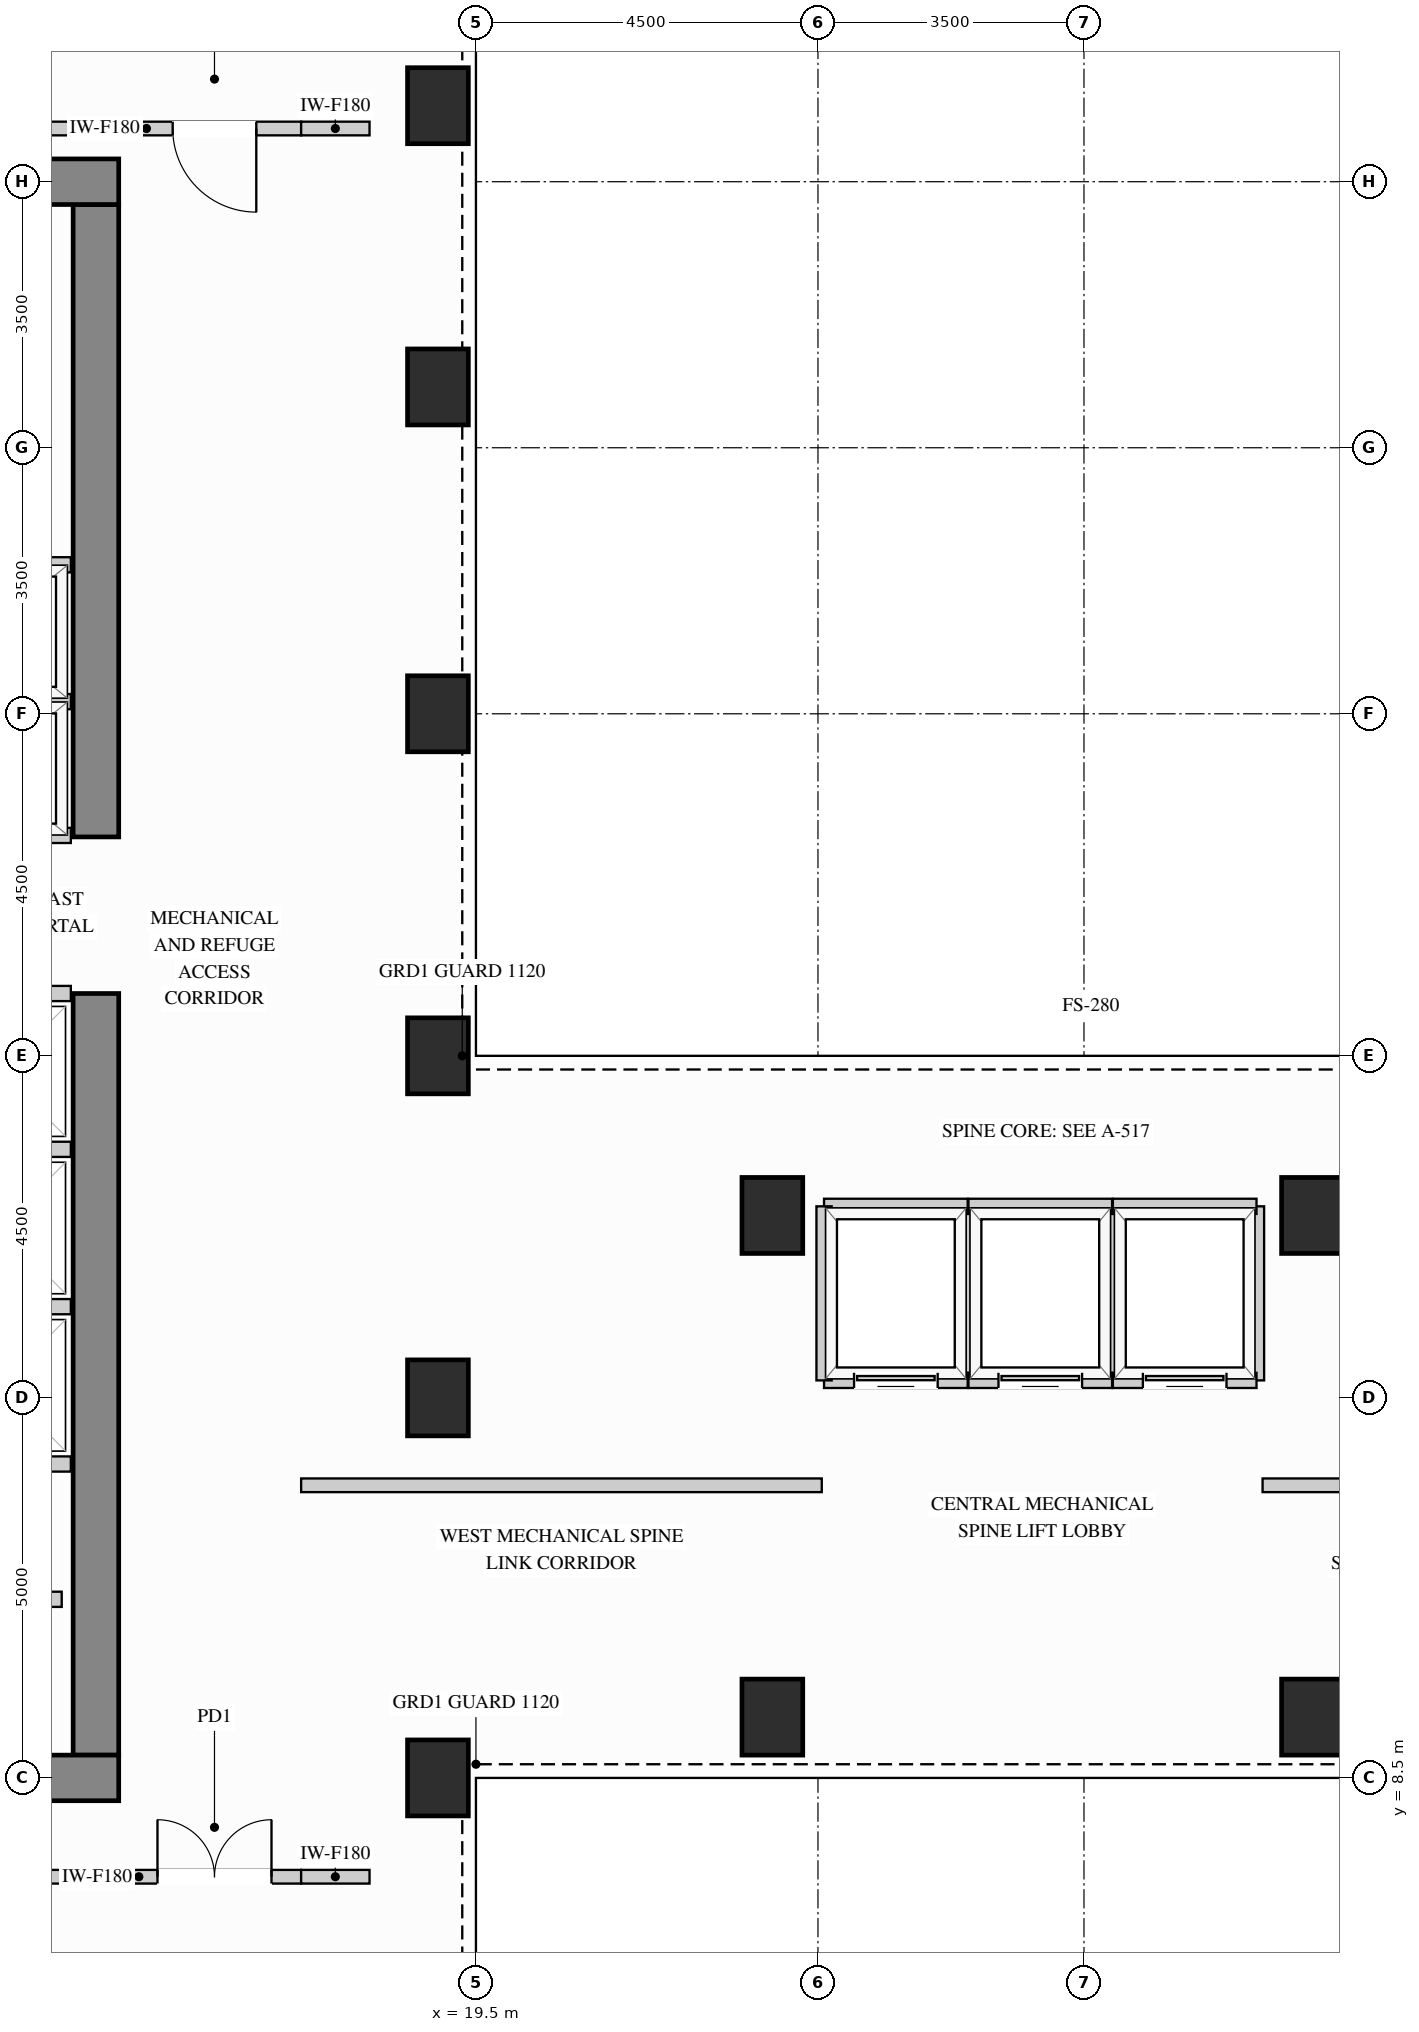
"""IFC4 building model, lengths in metres.
Left out: names, types, materials, properties, quantities, classifications, styles, units other than length and angle.
Written with IfcOpenShell. Run it as: python <this file> out.ifc"""

import sys

from ifc_helpers import new_model, si_unit, direction, frame, frame_2d, origin, origin_2d, place, context, subcontext, project, spatial, rectangle, extrude, source, transform, mapped, element, fill, save


model = new_model("IFC4")
c1 = context("Model", 3, precision=1e-05, world=origin(), true_north=direction((0.0, 1.0)))
c2 = subcontext(c1, "Body", "Model", "MODEL_VIEW")
j1 = project(units=[si_unit("LENGTHUNIT", "METRE"), si_unit("PLANEANGLEUNIT", "RADIAN")], contexts=[c1])
p1 = place(None, origin())
s1 = spatial("IfcSite", under=j1, at=p1, CompositionType="ELEMENT")
p2 = place(p1, origin())
s2 = spatial("IfcBuilding", under=s1, at=p2, CompositionType="ELEMENT")
p3 = place(p2, frame((0.0, 0.0, 207.9)))
s3 = spatial("IfcBuildingStorey", under=s2, at=p3, CompositionType="ELEMENT", Elevation=207.9)
m1 = source(origin(), c2, "Body", "SweptSolid", [
    extrude(rectangle(XDim=0.8, YDim=1.0, at=origin_2d()), origin(), (0.0, 0.0, 1.0), 4.26),
])
for number, where, z_axis, x_axis in (
    (1, (19.0, 13.5, 0.0), (0.0, 0.0, 1.0), (1.0, 0.0, 0.0)),
    (2, (19.0, 18.0, 0.0), (0.0, 0.0, 1.0), (1.0, 0.0, 0.0)),
    (3, (19.0, 22.5, 0.0), (0.0, 0.0, 1.0), (1.0, 0.0, 0.0)),
    (4, (19.0, 26.8, 0.0), (0.0, 0.0, 1.0), (1.0, 0.0, 0.0)),
    (5, (19.0, 30.5, 0.0), (0.0, 0.0, 1.0), (1.0, 0.0, 0.0)),
    (6, (19.0, 8.5, 0.0), (0.0, 0.0, 1.0), (1.0, 0.0, 0.0)),
    (7, (23.4, 15.9, 0.0), (0.0, 0.0, 1.0), (1.0, 0.0, 0.0)),
    (8, (23.4, 9.3, 0.0), (0.0, 0.0, 1.0), (1.0, 0.0, 0.0)),
    (9, (30.5, 15.9, 0.0), (0.0, 0.0, 1.0), (1.0, 0.0, 0.0)),
    (10, (30.5, 9.3, 0.0), (0.0, 0.0, 1.0), (1.0, 0.0, 0.0)),
):
    element("IfcColumn", number, at=place(p3, frame(where, z_axis=z_axis, x_axis=x_axis)), inside=s3, PredefinedType="COLUMN", context=c2, shape_type="MappedRepresentation", body=[
        mapped(m1, transform((0.0, 0.0, 0.0), x_axis=(1.0, 0.0, 0.0), y_axis=(0.0, 1.0, 0.0), z_axis=(0.0, 0.0, 1.0))),
    ])
m2 = source(origin(), c2, "Body", "SweptSolid", [
    extrude(rectangle(XDim=10.02, YDim=0.6, at=frame_2d((5.01, 0.0))), origin(), (0.0, 0.0, 1.0), 4.26),
])
p4 = place(p3, frame((14.5, 8.8, 0.0), z_axis=(0.0, 0.0, 1.0), x_axis=(0.0, 1.0, 0.0)))
e11 = element("IfcWall", 11, at=p4, inside=s3, PredefinedType="SHEAR", context=c2, shape_type="MappedRepresentation", body=[
    mapped(m2, transform((0.0, 0.0, 0.0), x_axis=(1.0, 0.0, 0.0), y_axis=(0.0, 1.0, 0.0), z_axis=(0.0, 0.0, 1.0))),
])
m3 = source(origin(), c2, "Body", "SweptSolid", [
    extrude(rectangle(XDim=8.32, YDim=0.6, at=frame_2d((4.16, 0.0))), origin(), (0.0, 0.0, 1.0), 4.26),
])
p5 = place(p3, frame((14.5, 20.88, 0.0), z_axis=(0.0, 0.0, 1.0), x_axis=(0.0, 1.0, 0.0)))
e12 = element("IfcWall", 12, at=p5, inside=s3, PredefinedType="SHEAR", context=c2, shape_type="MappedRepresentation", body=[
    mapped(m3, transform((0.0, 0.0, 0.0), x_axis=(1.0, 0.0, 0.0), y_axis=(0.0, 1.0, 0.0), z_axis=(0.0, 0.0, 1.0))),
])
m4 = source(origin(), c2, "Body", "SweptSolid", [
    extrude(rectangle(XDim=10.6, YDim=0.6, at=frame_2d((5.3, 0.0))), origin(), (0.0, 0.0, 1.0), 4.26),
])
for number, where, z_axis, x_axis in (
    (13, (4.2, 29.5, 0.0), (0.0, 0.0, 1.0), (1.0, 0.0, 0.0)),
    (14, (4.2, 8.5, 0.0), (0.0, 0.0, 1.0), (1.0, 0.0, 0.0)),
):
    element("IfcWall", number, at=place(p3, frame(where, z_axis=z_axis, x_axis=x_axis)), inside=s3, PredefinedType="SHEAR", context=c2, shape_type="MappedRepresentation", body=[
        mapped(m4, transform((0.0, 0.0, 0.0), x_axis=(1.0, 0.0, 0.0), y_axis=(0.0, 1.0, 0.0), z_axis=(0.0, 0.0, 1.0))),
    ])
p6 = place(p3, frame((14.92, 7.2, 0.0), z_axis=(0.0, 0.0, 1.0), x_axis=(1.0, 0.0, 0.0)))
e15 = element("IfcWall", 15, at=p6, inside=s3, PredefinedType="PARTITIONING", context=c2, shape_type="SweptSolid", body=[
    extrude(rectangle(XDim=2.28, YDim=0.18, at=frame_2d((1.14, 0.0))), origin(), (0.0, 0.0, 1.0), 4.245),
])
p7 = place(p6, frame((0.39, 0.0, 0.0)))
e16 = element("IfcOpeningElement", 16, at=p7, cuts=e15, PredefinedType="OPENING", context=c2, shape_type="SweptSolid", body=[
    extrude(rectangle(XDim=1.5, YDim=2.2, at=frame_2d((0.75, 1.1))), frame((0.0, 0.1, 0.0), z_axis=(0.0, -1.0, 0.0), x_axis=(1.0, 0.0, 0.0)), (0.0, 0.0, 1.0), 0.2),
])
m5 = source(origin(), c2, "Body", "SweptSolid", [
    extrude(rectangle(XDim=13.42, YDim=0.18, at=frame_2d((6.71, 0.0))), origin(), (0.0, 0.0, 1.0), 4.245),
])
p8 = place(p3, frame((1.5, 7.2, 0.0), z_axis=(0.0, 0.0, 1.0), x_axis=(1.0, 0.0, 0.0)))
e17 = element("IfcWall", 17, at=p8, inside=s3, PredefinedType="PARTITIONING", context=c2, shape_type="MappedRepresentation", body=[
    mapped(m5, transform((0.0, 0.0, 0.0), x_axis=(1.0, 0.0, 0.0), y_axis=(0.0, 1.0, 0.0), z_axis=(0.0, 0.0, 1.0))),
])
m6 = source(origin(), c2, "Body", "SweptSolid", [
    extrude(rectangle(XDim=0.9, YDim=0.18, at=frame_2d((0.45, 0.0))), origin(), (0.0, 0.0, 1.0), 4.245),
])
p9 = place(p3, frame((17.2, 7.2, 0.0), z_axis=(0.0, 0.0, 1.0), x_axis=(1.0, 0.0, 0.0)))
e18 = element("IfcWall", 18, at=p9, inside=s3, PredefinedType="PARTITIONING", context=c2, shape_type="MappedRepresentation", body=[
    mapped(m6, transform((0.0, 0.0, 0.0), x_axis=(1.0, 0.0, 0.0), y_axis=(0.0, 1.0, 0.0), z_axis=(0.0, 0.0, 1.0))),
])
p10 = place(p3, frame((14.92, 30.2, 0.0), z_axis=(0.0, 0.0, 1.0), x_axis=(1.0, 0.0, 0.0)))
e19 = element("IfcWall", 19, at=p10, inside=s3, PredefinedType="PARTITIONING", context=c2, shape_type="SweptSolid", body=[
    extrude(rectangle(XDim=2.28, YDim=0.18, at=frame_2d((1.14, 0.0))), origin(), (0.0, 0.0, 1.0), 4.245),
])
p11 = place(p10, frame((0.59, 0.0, 0.0)))
e20 = element("IfcOpeningElement", 20, at=p11, cuts=e19, PredefinedType="OPENING", context=c2, shape_type="SweptSolid", body=[
    extrude(rectangle(XDim=1.1, YDim=2.15, at=frame_2d((0.55, 1.075))), frame((0.0, 0.1, 0.0), z_axis=(0.0, -1.0, 0.0), x_axis=(1.0, 0.0, 0.0)), (0.0, 0.0, 1.0), 0.2),
])
p12 = place(p3, frame((1.5, 30.2, 0.0), z_axis=(0.0, 0.0, 1.0), x_axis=(1.0, 0.0, 0.0)))
e21 = element("IfcWall", 21, at=p12, inside=s3, PredefinedType="PARTITIONING", context=c2, shape_type="MappedRepresentation", body=[
    mapped(m5, transform((0.0, 0.0, 0.0), x_axis=(1.0, 0.0, 0.0), y_axis=(0.0, 1.0, 0.0), z_axis=(0.0, 0.0, 1.0))),
])
p13 = place(p3, frame((17.2, 30.2, 0.0), z_axis=(0.0, 0.0, 1.0), x_axis=(1.0, 0.0, 0.0)))
e22 = element("IfcWall", 22, at=p13, inside=s3, PredefinedType="PARTITIONING", context=c2, shape_type="MappedRepresentation", body=[
    mapped(m6, transform((0.0, 0.0, 0.0), x_axis=(1.0, 0.0, 0.0), y_axis=(0.0, 1.0, 0.0), z_axis=(0.0, 0.0, 1.0))),
])
m7 = source(origin(), c2, "Body", "SweptSolid", [
    extrude(rectangle(XDim=6.85, YDim=0.18, at=frame_2d((3.425, 0.0))), origin(), (0.0, 0.0, 1.0), 4.245),
])
p14 = place(p3, frame((17.2, 12.35, 0.0), z_axis=(0.0, 0.0, 1.0), x_axis=(1.0, 0.0, 0.0)))
e23 = element("IfcWall", 23, at=p14, inside=s3, PredefinedType="PARTITIONING", context=c2, shape_type="MappedRepresentation", body=[
    mapped(m7, transform((0.0, 0.0, 0.0), x_axis=(1.0, 0.0, 0.0), y_axis=(0.0, 1.0, 0.0), z_axis=(0.0, 0.0, 1.0))),
])
m8 = source(origin(), c2, "Body", "SweptSolid", [
    extrude(rectangle(XDim=4.55, YDim=0.18, at=frame_2d((2.275, 0.0))), origin(), (0.0, 0.0, 1.0), 4.245),
])
p15 = place(p3, frame((29.85, 12.35, 0.0), z_axis=(0.0, 0.0, 1.0), x_axis=(1.0, 0.0, 0.0)))
e24 = element("IfcWall", 24, at=p15, inside=s3, PredefinedType="PARTITIONING", context=c2, shape_type="MappedRepresentation", body=[
    mapped(m8, transform((0.0, 0.0, 0.0), x_axis=(1.0, 0.0, 0.0), y_axis=(0.0, 1.0, 0.0), z_axis=(0.0, 0.0, 1.0))),
])
m9 = source(origin(), c2, "Body", "SweptSolid", [
    extrude(rectangle(XDim=1.63, YDim=0.2, at=frame_2d((0.815, 0.0))), origin(), (0.0, 0.0, 1.0), 4.245),
])
p16 = place(p3, frame((12.42, 10.85, 0.0), z_axis=(0.0, 0.0, 1.0), x_axis=(1.0, 0.0, 0.0)))
e25 = element("IfcWall", 25, at=p16, inside=s3, PredefinedType="PARTITIONING", context=c2, shape_type="MappedRepresentation", body=[
    mapped(m9, transform((0.0, 0.0, 0.0), x_axis=(1.0, 0.0, 0.0), y_axis=(0.0, 1.0, 0.0), z_axis=(0.0, 0.0, 1.0))),
])
m10 = source(origin(), c2, "Body", "SweptSolid", [
    extrude(rectangle(XDim=2.34, YDim=0.2, at=frame_2d((1.17, 0.0))), origin(), (0.0, 0.0, 1.0), 4.245),
])
for number, where, z_axis, x_axis in (
    (26, (11.83, 22.66, 0.0), (0.0, 0.0, 1.0), (1.0, 0.0, 0.0)),
    (27, (11.83, 20.9, 0.0), (0.0, 0.0, 1.0), (1.0, 0.0, 0.0)),
    (28, (11.83, 24.46, 0.0), (0.0, 0.0, 1.0), (1.0, 0.0, 0.0)),
):
    element("IfcWall", number, at=place(p3, frame(where, z_axis=z_axis, x_axis=x_axis)), inside=s3, PredefinedType="PARTITIONING", context=c2, shape_type="MappedRepresentation", body=[
        mapped(m10, transform((0.0, 0.0, 0.0), x_axis=(1.0, 0.0, 0.0), y_axis=(0.0, 1.0, 0.0), z_axis=(0.0, 0.0, 1.0))),
    ])
m11 = source(origin(), c2, "Body", "SweptSolid", [
    extrude(rectangle(XDim=1.94, YDim=0.2, at=frame_2d((0.97, 0.0))), origin(), (0.0, 0.0, 1.0), 4.245),
])
for number, where, z_axis, x_axis in (
    (29, (12.23, 14.7, 0.0), (0.0, 0.0, 1.0), (1.0, 0.0, 0.0)),
    (30, (12.23, 12.63, 0.0), (0.0, 0.0, 1.0), (1.0, 0.0, 0.0)),
    (31, (12.23, 16.77, 0.0), (0.0, 0.0, 1.0), (1.0, 0.0, 0.0)),
    (32, (12.23, 18.82, 0.0), (0.0, 0.0, 1.0), (1.0, 0.0, 0.0)),
):
    element("IfcWall", number, at=place(p3, frame(where, z_axis=z_axis, x_axis=x_axis)), inside=s3, PredefinedType="PARTITIONING", context=c2, shape_type="MappedRepresentation", body=[
        mapped(m11, transform((0.0, 0.0, 0.0), x_axis=(1.0, 0.0, 0.0), y_axis=(0.0, 1.0, 0.0), z_axis=(0.0, 0.0, 1.0))),
    ])
m12 = source(origin(), c2, "Body", "SweptSolid", [
    extrude(rectangle(XDim=2.29, YDim=0.2, at=frame_2d((1.145, 0.0))), origin(), (0.0, 0.0, 1.0), 4.245),
])
p17 = place(p3, frame((25.97, 13.73, 0.0), z_axis=(0.0, 0.0, 1.0), x_axis=(0.0, 1.0, 0.0)))
e33 = element("IfcWall", 33, at=p17, inside=s3, PredefinedType="PARTITIONING", context=c2, shape_type="MappedRepresentation", body=[
    mapped(m12, transform((0.0, 0.0, 0.0), x_axis=(1.0, 0.0, 0.0), y_axis=(0.0, 1.0, 0.0), z_axis=(0.0, 0.0, 1.0))),
])
m13 = source(origin(), c2, "Body", "SweptSolid", [
    extrude(rectangle(XDim=1.89, YDim=0.2, at=frame_2d((0.945, 0.0))), origin(), (0.0, 0.0, 1.0), 3.245),
])
p18 = place(p3, frame((24.08, 16.02, 0.0), z_axis=(0.0, 0.0, 1.0), x_axis=(1.0, 0.0, 0.0)))
e34 = element("IfcWall", 34, at=p18, inside=s3, PredefinedType="PARTITIONING", context=c2, shape_type="MappedRepresentation", body=[
    mapped(m13, transform((0.0, 0.0, 0.0), x_axis=(1.0, 0.0, 0.0), y_axis=(0.0, 1.0, 0.0), z_axis=(0.0, 0.0, 1.0))),
])
p19 = place(p3, frame((24.08, 13.73, 0.0), z_axis=(0.0, 0.0, 1.0), x_axis=(1.0, 0.0, 0.0)))
e35 = element("IfcWall", 35, at=p19, inside=s3, PredefinedType="PARTITIONING", context=c2, shape_type="SweptSolid", body=[
    extrude(rectangle(XDim=1.89, YDim=0.2, at=frame_2d((0.945, 0.0))), origin(), (0.0, 0.0, 1.0), 3.326),
])
p20 = place(p19, frame((0.395, 0.0, 0.0)))
e36 = element("IfcOpeningElement", 36, at=p20, cuts=e35, PredefinedType="OPENING", context=c2, shape_type="SweptSolid", body=[
    extrude(rectangle(XDim=1.1, YDim=2.2, at=frame_2d((0.55, 1.1))), frame((0.0, 0.11, 0.0), z_axis=(0.0, -1.0, 0.0), x_axis=(1.0, 0.0, 0.0)), (0.0, 0.0, 1.0), 0.22),
])
for number, where, z_axis, x_axis in (
    (37, (24.08, 13.73, 0.0), (0.0, 0.0, 1.0), (0.0, 1.0, 0.0)),
    (38, (27.87, 13.73, 0.0), (0.0, 0.0, 1.0), (0.0, 1.0, 0.0)),
):
    element("IfcWall", number, at=place(p3, frame(where, z_axis=z_axis, x_axis=x_axis)), inside=s3, PredefinedType="PARTITIONING", context=c2, shape_type="MappedRepresentation", body=[
        mapped(m12, transform((0.0, 0.0, 0.0), x_axis=(1.0, 0.0, 0.0), y_axis=(0.0, 1.0, 0.0), z_axis=(0.0, 0.0, 1.0))),
    ])
m14 = source(origin(), c2, "Body", "SweptSolid", [
    extrude(rectangle(XDim=1.89, YDim=0.2, at=frame_2d((0.945, 0.0))), origin(), (0.0, 0.0, 1.0), 3.245),
])
p21 = place(p3, frame((25.98, 16.02, 0.0), z_axis=(0.0, 0.0, 1.0), x_axis=(1.0, 0.0, 0.0)))
e39 = element("IfcWall", 39, at=p21, inside=s3, PredefinedType="PARTITIONING", context=c2, shape_type="MappedRepresentation", body=[
    mapped(m14, transform((0.0, 0.0, 0.0), x_axis=(1.0, 0.0, 0.0), y_axis=(0.0, 1.0, 0.0), z_axis=(0.0, 0.0, 1.0))),
])
p22 = place(p3, frame((25.98, 13.73, 0.0), z_axis=(0.0, 0.0, 1.0), x_axis=(1.0, 0.0, 0.0)))
e40 = element("IfcWall", 40, at=p22, inside=s3, PredefinedType="PARTITIONING", context=c2, shape_type="SweptSolid", body=[
    extrude(rectangle(XDim=1.89, YDim=0.2, at=frame_2d((0.945, 0.0))), origin(), (0.0, 0.0, 1.0), 3.326),
])
p23 = place(p22, frame((0.395, 0.0, 0.0)))
e41 = element("IfcOpeningElement", 41, at=p23, cuts=e40, PredefinedType="OPENING", context=c2, shape_type="SweptSolid", body=[
    extrude(rectangle(XDim=1.1, YDim=2.2, at=frame_2d((0.55, 1.1))), frame((0.0, 0.11, 0.0), z_axis=(0.0, -1.0, 0.0), x_axis=(1.0, 0.0, 0.0)), (0.0, 0.0, 1.0), 0.22),
])
p24 = place(p3, frame((29.77, 13.73, 0.0), z_axis=(0.0, 0.0, 1.0), x_axis=(0.0, 1.0, 0.0)))
e42 = element("IfcWall", 42, at=p24, inside=s3, PredefinedType="PARTITIONING", context=c2, shape_type="MappedRepresentation", body=[
    mapped(m12, transform((0.0, 0.0, 0.0), x_axis=(1.0, 0.0, 0.0), y_axis=(0.0, 1.0, 0.0), z_axis=(0.0, 0.0, 1.0))),
])
p25 = place(p3, frame((27.88, 16.02, 0.0), z_axis=(0.0, 0.0, 1.0), x_axis=(1.0, 0.0, 0.0)))
e43 = element("IfcWall", 43, at=p25, inside=s3, PredefinedType="PARTITIONING", context=c2, shape_type="MappedRepresentation", body=[
    mapped(m14, transform((0.0, 0.0, 0.0), x_axis=(1.0, 0.0, 0.0), y_axis=(0.0, 1.0, 0.0), z_axis=(0.0, 0.0, 1.0))),
])
p26 = place(p3, frame((27.88, 13.73, 0.0), z_axis=(0.0, 0.0, 1.0), x_axis=(1.0, 0.0, 0.0)))
e44 = element("IfcWall", 44, at=p26, inside=s3, PredefinedType="PARTITIONING", context=c2, shape_type="SweptSolid", body=[
    extrude(rectangle(XDim=1.89, YDim=0.2, at=frame_2d((0.945, 0.0))), origin(), (0.0, 0.0, 1.0), 3.326),
])
p27 = place(p26, frame((0.395, 0.0, 0.0)))
e45 = element("IfcOpeningElement", 45, at=p27, cuts=e44, PredefinedType="OPENING", context=c2, shape_type="SweptSolid", body=[
    extrude(rectangle(XDim=1.1, YDim=2.2, at=frame_2d((0.55, 1.1))), frame((0.0, 0.11, 0.0), z_axis=(0.0, -1.0, 0.0), x_axis=(1.0, 0.0, 0.0)), (0.0, 0.0, 1.0), 0.22),
])
m15 = source(origin(), c2, "Body", "SweptSolid", [
    extrude(rectangle(XDim=1.1, YDim=2.15, at=frame_2d((0.55, 1.075))), frame((0.0, 0.025, 0.0), z_axis=(0.0, -1.0, 0.0), x_axis=(1.0, 0.0, 0.0)), (0.0, 0.0, 1.0), 0.05),
])
p28 = place(p11, origin())
e46 = element("IfcDoor", 46, at=p28, inside=s3, OperationType="SINGLE_SWING_RIGHT", PredefinedType="DOOR", context=c2, shape_type="MappedRepresentation", body=[
    mapped(m15, transform((0.0, 0.0, 0.0), x_axis=(1.0, 0.0, 0.0), y_axis=(0.0, 1.0, 0.0), z_axis=(0.0, 0.0, 1.0))),
])
fill(e20, e46)
m16 = source(origin(), c2, "Body", "SweptSolid", [
    extrude(rectangle(XDim=1.1, YDim=2.2, at=frame_2d((0.55, 1.1))), frame((0.0, 0.025, 0.0), z_axis=(0.0, -1.0, 0.0), x_axis=(1.0, 0.0, 0.0)), (0.0, 0.0, 1.0), 0.05),
])
p29 = place(p20, origin())
e47 = element("IfcDoor", 47, at=p29, inside=s3, OperationType="SLIDING_TO_LEFT", PredefinedType="DOOR", context=c2, shape_type="MappedRepresentation", body=[
    mapped(m16, transform((0.0, 0.0, 0.0), x_axis=(1.0, 0.0, 0.0), y_axis=(0.0, 1.0, 0.0), z_axis=(0.0, 0.0, 1.0))),
])
fill(e36, e47)
p30 = place(p23, origin())
e48 = element("IfcDoor", 48, at=p30, inside=s3, OperationType="SLIDING_TO_LEFT", PredefinedType="DOOR", context=c2, shape_type="MappedRepresentation", body=[
    mapped(m16, transform((0.0, 0.0, 0.0), x_axis=(1.0, 0.0, 0.0), y_axis=(0.0, 1.0, 0.0), z_axis=(0.0, 0.0, 1.0))),
])
fill(e41, e48)
p31 = place(p27, origin())
e49 = element("IfcDoor", 49, at=p31, inside=s3, OperationType="SLIDING_TO_LEFT", PredefinedType="DOOR", context=c2, shape_type="MappedRepresentation", body=[
    mapped(m16, transform((0.0, 0.0, 0.0), x_axis=(1.0, 0.0, 0.0), y_axis=(0.0, 1.0, 0.0), z_axis=(0.0, 0.0, 1.0))),
])
fill(e45, e49)
m17 = source(origin(), c2, "Body", "SweptSolid", [
    extrude(rectangle(XDim=1.5, YDim=2.2, at=frame_2d((0.75, 1.1))), frame((0.0, 0.025, 0.0), z_axis=(0.0, -1.0, 0.0), x_axis=(1.0, 0.0, 0.0)), (0.0, 0.0, 1.0), 0.05),
])
p32 = place(p7, origin())
e50 = element("IfcDoor", 50, at=p32, inside=s3, OperationType="DOUBLE_DOOR_SINGLE_SWING", PredefinedType="DOOR", context=c2, shape_type="MappedRepresentation", body=[
    mapped(m17, transform((0.0, 0.0, 0.0), x_axis=(1.0, 0.0, 0.0), y_axis=(0.0, 1.0, 0.0), z_axis=(0.0, 0.0, 1.0))),
])
fill(e16, e50)
save(model, sys.argv[1])
